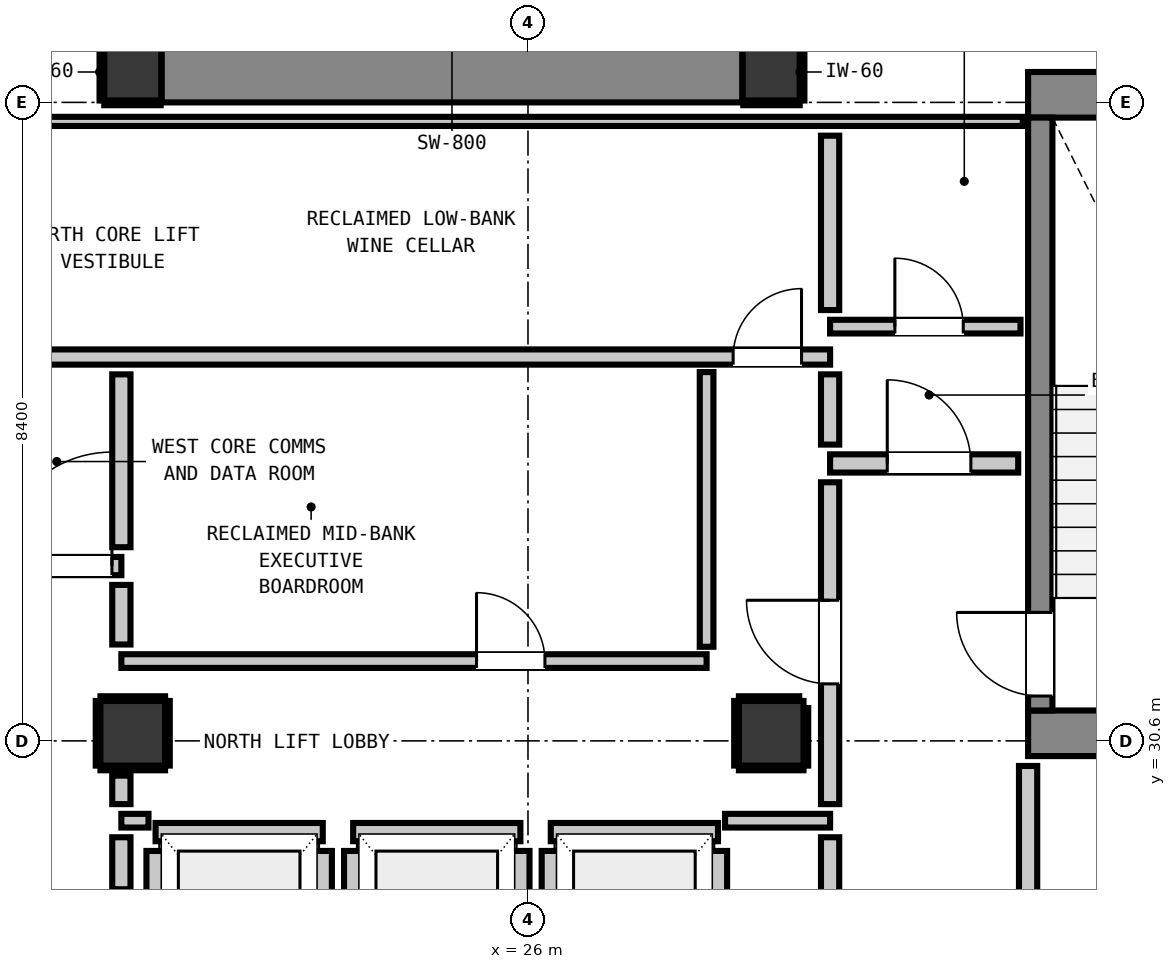
"""IFC4 building model, lengths in metres.
Left out: names, types, materials, properties, quantities, classifications, styles, units other than length and angle.
Written with IfcOpenShell. Run it as: python <this file> out.ifc"""

import sys

from ifc_helpers import new_model, si_unit, direction, frame, frame_2d, origin, origin_2d, place, context, subcontext, project, spatial, rectangle, extrude, element, fill, save


model = new_model("IFC4")
c1 = context("Model", 3, precision=1e-05, world=origin(), true_north=direction((0.0, 1.0)))
c2 = subcontext(c1, "Body", "Model", "MODEL_VIEW")
j1 = project(units=[si_unit("LENGTHUNIT", "METRE"), si_unit("PLANEANGLEUNIT", "RADIAN")], contexts=[c1])
p1 = place(None, origin())
s1 = spatial("IfcSite", under=j1, at=p1, CompositionType="ELEMENT")
p2 = place(p1, origin())
s2 = spatial("IfcBuilding", under=s1, at=p2, CompositionType="ELEMENT")
p3 = place(p2, frame((0.0, 0.0, 265.56)))
s3 = spatial("IfcBuildingStorey", under=s2, at=p3, CompositionType="ELEMENT", Elevation=265.56)
for number, where, z_axis, x_axis in (
    (1, (20.8, 39.4, 0.0), (0.0, 0.0, 1.0), (1.0, 0.0, 0.0)),
    (2, (29.2, 39.4, 0.0), (0.0, 0.0, 1.0), (1.0, 0.0, 0.0)),
):
    element("IfcColumn", number, at=place(p3, frame(where, z_axis=z_axis, x_axis=x_axis)), inside=s3, PredefinedType="COLUMN", context=c2, shape_type="SweptSolid", body=[
        extrude(rectangle(XDim=0.75, YDim=0.75, at=origin_2d()), origin(), (0.0, 0.0, 1.0), 3.32),
    ])
p4 = place(p3, frame((32.58, 39.1, 0.0), z_axis=(0.0, 0.0, 1.0), x_axis=(1.0, 0.0, 0.0)))
e3 = element("IfcWall", 3, at=p4, inside=s3, PredefinedType="SHEAR", context=c2, shape_type="SweptSolid", body=[
    extrude(rectangle(XDim=4.08, YDim=0.6, at=frame_2d((2.04, 0.0))), origin(), (0.0, 0.0, 1.0), 3.32),
])
p5 = place(p3, frame((32.58, 30.7, 0.0), z_axis=(0.0, 0.0, 1.0), x_axis=(1.0, 0.0, 0.0)))
e4 = element("IfcWall", 4, at=p5, inside=s3, PredefinedType="SHEAR", context=c2, shape_type="SweptSolid", body=[
    extrude(rectangle(XDim=3.54, YDim=0.6, at=frame_2d((1.77, 0.0))), origin(), (0.0, 0.0, 1.0), 3.32),
])
p6 = place(p3, frame((21.18, 39.4, 0.0), z_axis=(0.0, 0.0, 1.0), x_axis=(1.0, 0.0, 0.0)))
e5 = element("IfcWall", 5, at=p6, inside=s3, PredefinedType="SHEAR", context=c2, shape_type="SweptSolid", body=[
    extrude(rectangle(XDim=7.64, YDim=0.8, at=frame_2d((3.82, 0.0))), origin(), (0.0, 0.0, 1.0), 3.32),
])
p7 = place(p3, frame((32.74, 31.0, 0.0), z_axis=(0.0, 0.0, 1.0), x_axis=(0.0, 1.0, 0.0)))
e6 = element("IfcWall", 6, at=p7, inside=s3, PredefinedType="SHEAR", context=c2, shape_type="SweptSolid", body=[
    extrude(rectangle(XDim=7.8, YDim=0.32, at=frame_2d((3.9, 0.0))), origin(), (0.0, 0.0, 1.0), 3.32),
])
p8 = place(p7, frame((0.19, 0.0, 0.0)))
e7 = element("IfcOpeningElement", 7, at=p8, cuts=e6, PredefinedType="OPENING", context=c2, shape_type="SweptSolid", body=[
    extrude(rectangle(XDim=1.1, YDim=2.15, at=frame_2d((0.55, 1.075))), frame((0.0, 0.17, 0.0), z_axis=(0.0, -1.0, 0.0), x_axis=(1.0, 0.0, 0.0)), (0.0, 0.0, 1.0), 0.34),
])
for number, where, z_axis, x_axis in (
    (8, (20.8, 30.7, 0.0), (0.0, 0.0, 1.0), (1.0, 0.0, 0.0)),
    (9, (29.2, 30.7, 0.0), (0.0, 0.0, 1.0), (1.0, 0.0, 0.0)),
):
    element("IfcColumn", number, at=place(p3, frame(where, z_axis=z_axis, x_axis=x_axis)), inside=s3, PredefinedType="COLUMN", context=c2, shape_type="SweptSolid", body=[
        extrude(rectangle(XDim=0.85, YDim=0.85, at=origin_2d()), origin(), (0.0, 0.0, 1.0), 3.32),
    ])
p9 = place(p3, frame((21.1, 29.4, 0.0), z_axis=(0.0, 0.0, 1.0), x_axis=(1.0, 0.0, 0.0)))
e10 = element("IfcWall", 10, at=p9, inside=s3, PredefinedType="PARTITIONING", context=c2, shape_type="SweptSolid", body=[
    extrude(rectangle(XDim=2.2, YDim=0.24, at=frame_2d((1.1, 0.0))), origin(), (0.0, 0.0, 1.0), 3.1),
])
p10 = place(p3, frame((21.1, 27.048, 0.0), z_axis=(0.0, 0.0, 1.0), x_axis=(0.0, 1.0, 0.0)))
e11 = element("IfcWall", 11, at=p10, inside=s3, PredefinedType="PARTITIONING", context=c2, shape_type="SweptSolid", body=[
    extrude(rectangle(XDim=2.104, YDim=0.24, at=frame_2d((1.052, 0.0))), origin(), (0.0, 0.0, 1.0), 2.335),
])
p11 = place(p3, frame((23.3, 27.048, 0.0), z_axis=(0.0, 0.0, 1.0), x_axis=(0.0, 1.0, 0.0)))
e12 = element("IfcWall", 12, at=p11, inside=s3, PredefinedType="PARTITIONING", context=c2, shape_type="SweptSolid", body=[
    extrude(rectangle(XDim=2.104, YDim=0.24, at=frame_2d((1.052, 0.0))), origin(), (0.0, 0.0, 1.0), 3.1),
])
p12 = place(p3, frame((23.7, 29.4, 0.0), z_axis=(0.0, 0.0, 1.0), x_axis=(1.0, 0.0, 0.0)))
e13 = element("IfcWall", 13, at=p12, inside=s3, PredefinedType="PARTITIONING", context=c2, shape_type="SweptSolid", body=[
    extrude(rectangle(XDim=2.2, YDim=0.24, at=frame_2d((1.1, 0.0))), origin(), (0.0, 0.0, 1.0), 3.1),
])
for number, where, z_axis, x_axis in (
    (14, (23.7, 27.048, 0.0), (0.0, 0.0, 1.0), (0.0, 1.0, 0.0)),
    (15, (25.9, 27.048, 0.0), (0.0, 0.0, 1.0), (0.0, 1.0, 0.0)),
):
    element("IfcWall", number, at=place(p3, frame(where, z_axis=z_axis, x_axis=x_axis)), inside=s3, PredefinedType="PARTITIONING", context=c2, shape_type="SweptSolid", body=[
        extrude(rectangle(XDim=2.104, YDim=0.24, at=frame_2d((1.052, 0.0))), origin(), (0.0, 0.0, 1.0), 3.1),
    ])
p13 = place(p3, frame((26.3, 29.4, 0.0), z_axis=(0.0, 0.0, 1.0), x_axis=(1.0, 0.0, 0.0)))
e16 = element("IfcWall", 16, at=p13, inside=s3, PredefinedType="PARTITIONING", context=c2, shape_type="SweptSolid", body=[
    extrude(rectangle(XDim=2.2, YDim=0.24, at=frame_2d((1.1, 0.0))), origin(), (0.0, 0.0, 1.0), 3.1),
])
p14 = place(p3, frame((26.3, 27.048, 0.0), z_axis=(0.0, 0.0, 1.0), x_axis=(0.0, 1.0, 0.0)))
e17 = element("IfcWall", 17, at=p14, inside=s3, PredefinedType="PARTITIONING", context=c2, shape_type="SweptSolid", body=[
    extrude(rectangle(XDim=2.104, YDim=0.24, at=frame_2d((1.052, 0.0))), origin(), (0.0, 0.0, 1.0), 3.1),
])
p15 = place(p3, frame((28.5, 27.33, 0.0), z_axis=(0.0, 0.0, 1.0), x_axis=(0.0, 1.0, 0.0)))
e18 = element("IfcWall", 18, at=p15, inside=s3, PredefinedType="PARTITIONING", context=c2, shape_type="SweptSolid", body=[
    extrude(rectangle(XDim=1.822, YDim=0.24, at=frame_2d((0.911, 0.0))), origin(), (0.0, 0.0, 1.0), 3.1),
])
p16 = place(p3, frame((17.45, 32.9, 0.0), z_axis=(0.0, 0.0, 1.0), x_axis=(1.0, 0.0, 0.0)))
e19 = element("IfcWall", 19, at=p16, inside=s3, PredefinedType="PARTITIONING", context=c2, shape_type="SweptSolid", body=[
    extrude(rectangle(XDim=3.2, YDim=0.24, at=frame_2d((1.6, 0.0))), origin(), (0.0, 0.0, 1.0), 3.1),
])
p17 = place(p16, frame((0.159, 0.0, 0.0)))
e20 = element("IfcOpeningElement", 20, at=p17, cuts=e19, PredefinedType="OPENING", context=c2, shape_type="SweptSolid", body=[
    extrude(rectangle(XDim=1.1, YDim=2.15, at=frame_2d((0.55, 1.075))), frame((0.0, 0.13, 0.0), z_axis=(0.0, -1.0, 0.0), x_axis=(1.0, 0.0, 0.0)), (0.0, 0.0, 1.0), 0.26),
])
p18 = place(p16, frame((1.576, 0.0, 0.0)))
e21 = element("IfcOpeningElement", 21, at=p18, cuts=e19, PredefinedType="OPENING", context=c2, shape_type="SweptSolid", body=[
    extrude(rectangle(XDim=1.5, YDim=2.15, at=frame_2d((0.75, 1.075))), frame((0.0, 0.13, 0.0), z_axis=(0.0, -1.0, 0.0), x_axis=(1.0, 0.0, 0.0)), (0.0, 0.0, 1.0), 0.26),
])
p19 = place(p3, frame((29.975, 34.25, 0.0), z_axis=(0.0, 0.0, 1.0), x_axis=(1.0, 0.0, 0.0)))
e22 = element("IfcWall", 22, at=p19, inside=s3, PredefinedType="PARTITIONING", context=c2, shape_type="SweptSolid", body=[
    extrude(rectangle(XDim=2.475, YDim=0.24, at=frame_2d((1.237, 0.0))), origin(), (0.0, 0.0, 1.0), 3.1),
])
p20 = place(p19, frame((0.752, 0.0, 0.0)))
e23 = element("IfcOpeningElement", 23, at=p20, cuts=e22, PredefinedType="OPENING", context=c2, shape_type="SweptSolid", body=[
    extrude(rectangle(XDim=1.1, YDim=2.15, at=frame_2d((0.55, 1.075))), frame((0.0, 0.13, 0.0), z_axis=(0.0, -1.0, 0.0), x_axis=(1.0, 0.0, 0.0)), (0.0, 0.0, 1.0), 0.26),
])
p21 = place(p3, frame((18.95, 35.65, 0.0), z_axis=(0.0, 0.0, 1.0), x_axis=(1.0, 0.0, 0.0)))
e24 = element("IfcWall", 24, at=p21, inside=s3, PredefinedType="PARTITIONING", context=c2, shape_type="SweptSolid", body=[
    extrude(rectangle(XDim=11.025, YDim=0.2, at=frame_2d((5.513, 0.0))), origin(), (0.0, 0.0, 1.0), 3.1),
])
p22 = place(p21, frame((9.749, 0.0, 0.0)))
e25 = element("IfcOpeningElement", 25, at=p22, cuts=e24, PredefinedType="OPENING", context=c2, shape_type="SweptSolid", body=[
    extrude(rectangle(XDim=0.9, YDim=2.1, at=frame_2d((0.45, 1.05))), frame((0.0, 0.11, 0.0), z_axis=(0.0, -1.0, 0.0), x_axis=(1.0, 0.0, 0.0)), (0.0, 0.0, 1.0), 0.22),
])
p23 = place(p3, frame((20.65, 29.55, 0.0), z_axis=(0.0, 0.0, 1.0), x_axis=(1.0, 0.0, 0.0)))
e26 = element("IfcWall", 26, at=p23, inside=s3, PredefinedType="PARTITIONING", context=c2, shape_type="SweptSolid", body=[
    extrude(rectangle(XDim=0.357, YDim=0.18, at=frame_2d((0.179, 0.0))), origin(), (0.0, 0.0, 1.0), 3.1),
])
p24 = place(p3, frame((28.593, 29.55, 0.0), z_axis=(0.0, 0.0, 1.0), x_axis=(1.0, 0.0, 0.0)))
e27 = element("IfcWall", 27, at=p24, inside=s3, PredefinedType="PARTITIONING", context=c2, shape_type="SweptSolid", body=[
    extrude(rectangle(XDim=1.382, YDim=0.18, at=frame_2d((0.691, 0.0))), origin(), (0.0, 0.0, 1.0), 3.1),
])
p25 = place(p3, frame((20.65, 31.65, 0.0), z_axis=(0.0, 0.0, 1.0), x_axis=(1.0, 0.0, 0.0)))
e28 = element("IfcWall", 28, at=p25, inside=s3, PredefinedType="PARTITIONING", context=c2, shape_type="SweptSolid", body=[
    extrude(rectangle(XDim=7.7, YDim=0.18, at=frame_2d((3.85, 0.0))), origin(), (0.0, 0.0, 1.0), 3.1),
])
p26 = place(p25, frame((4.673, 0.0, 0.0)))
e29 = element("IfcOpeningElement", 29, at=p26, cuts=e28, PredefinedType="OPENING", context=c2, shape_type="SweptSolid", body=[
    extrude(rectangle(XDim=0.9, YDim=2.1, at=frame_2d((0.45, 1.05))), frame((0.0, 0.1, 0.0), z_axis=(0.0, -1.0, 0.0), x_axis=(1.0, 0.0, 0.0)), (0.0, 0.0, 1.0), 0.2),
])
p27 = place(p3, frame((29.975, 36.05, 0.0), z_axis=(0.0, 0.0, 1.0), x_axis=(1.0, 0.0, 0.0)))
e30 = element("IfcWall", 30, at=p27, inside=s3, PredefinedType="PARTITIONING", context=c2, shape_type="SweptSolid", body=[
    extrude(rectangle(XDim=2.505, YDim=0.18, at=frame_2d((1.252, 0.0))), origin(), (0.0, 0.0, 1.0), 3.1),
])
p28 = place(p27, frame((0.852, 0.0, 0.0)))
e31 = element("IfcOpeningElement", 31, at=p28, cuts=e30, PredefinedType="OPENING", context=c2, shape_type="SweptSolid", body=[
    extrude(rectangle(XDim=0.9, YDim=2.1, at=frame_2d((0.45, 1.05))), frame((0.0, 0.1, 0.0), z_axis=(0.0, -1.0, 0.0), x_axis=(1.0, 0.0, 0.0)), (0.0, 0.0, 1.0), 0.2),
])
p29 = place(p3, frame((18.95, 38.75, 0.0), z_axis=(0.0, 0.0, 1.0), x_axis=(1.0, 0.0, 0.0)))
e32 = element("IfcWall", 32, at=p29, inside=s3, PredefinedType="PARTITIONING", context=c2, shape_type="SweptSolid", body=[
    extrude(rectangle(XDim=13.56, YDim=0.12, at=frame_2d((6.78, 0.0))), origin(), (0.0, 0.0, 1.0), 3.1),
])
p30 = place(p3, frame((20.65, 28.648, 0.0), z_axis=(0.0, 0.0, 1.0), x_axis=(0.0, 1.0, 0.0)))
e33 = element("IfcWall", 33, at=p30, inside=s3, PredefinedType="PARTITIONING", context=c2, shape_type="SweptSolid", body=[
    extrude(rectangle(XDim=0.684, YDim=0.24, at=frame_2d((0.342, 0.0))), origin(), (0.0, 0.0, 1.0), 2.335),
])
p31 = place(p3, frame((20.65, 29.768, 0.0), z_axis=(0.0, 0.0, 1.0), x_axis=(0.0, 1.0, 0.0)))
e34 = element("IfcWall", 34, at=p31, inside=s3, PredefinedType="PARTITIONING", context=c2, shape_type="SweptSolid", body=[
    extrude(rectangle(XDim=0.375, YDim=0.24, at=frame_2d((0.188, 0.0))), origin(), (0.0, 0.0, 1.0), 2.335),
])
p32 = place(p3, frame((20.65, 31.868, 0.0), z_axis=(0.0, 0.0, 1.0), x_axis=(0.0, 1.0, 0.0)))
e35 = element("IfcWall", 35, at=p32, inside=s3, PredefinedType="PARTITIONING", context=c2, shape_type="SweptSolid", body=[
    extrude(rectangle(XDim=0.784, YDim=0.24, at=frame_2d((0.392, 0.0))), origin(), (0.0, 0.0, 1.0), 2.335),
])
p33 = place(p3, frame((20.65, 33.148, 0.0), z_axis=(0.0, 0.0, 1.0), x_axis=(0.0, 1.0, 0.0)))
e36 = element("IfcWall", 36, at=p33, inside=s3, PredefinedType="PARTITIONING", context=c2, shape_type="SweptSolid", body=[
    extrude(rectangle(XDim=2.274, YDim=0.24, at=frame_2d((1.137, 0.0))), origin(), (0.0, 0.0, 1.0), 2.335),
])
p34 = place(p3, frame((29.975, 25.648, 0.0), z_axis=(0.0, 0.0, 1.0), x_axis=(0.0, 1.0, 0.0)))
e37 = element("IfcWall", 37, at=p34, inside=s3, PredefinedType="PARTITIONING", context=c2, shape_type="SweptSolid", body=[
    extrude(rectangle(XDim=3.684, YDim=0.24, at=frame_2d((1.842, 0.0))), origin(), (0.0, 0.0, 1.0), 3.1),
])
p35 = place(p3, frame((29.975, 29.768, 0.0), z_axis=(0.0, 0.0, 1.0), x_axis=(0.0, 1.0, 0.0)))
e38 = element("IfcWall", 38, at=p35, inside=s3, PredefinedType="PARTITIONING", context=c2, shape_type="SweptSolid", body=[
    extrude(rectangle(XDim=4.234, YDim=0.24, at=frame_2d((2.117, 0.0))), origin(), (0.0, 0.0, 1.0), 3.1),
])
p36 = place(p35, frame((1.582, 0.0, 0.0)))
e39 = element("IfcOpeningElement", 39, at=p36, cuts=e38, PredefinedType="OPENING", context=c2, shape_type="SweptSolid", body=[
    extrude(rectangle(XDim=1.1, YDim=2.15, at=frame_2d((0.55, 1.075))), frame((0.0, 0.13, 0.0), z_axis=(0.0, -1.0, 0.0), x_axis=(1.0, 0.0, 0.0)), (0.0, 0.0, 1.0), 0.26),
])
p37 = place(p3, frame((29.975, 34.498, 0.0), z_axis=(0.0, 0.0, 1.0), x_axis=(0.0, 1.0, 0.0)))
e40 = element("IfcWall", 40, at=p37, inside=s3, PredefinedType="PARTITIONING", context=c2, shape_type="SweptSolid", body=[
    extrude(rectangle(XDim=0.924, YDim=0.24, at=frame_2d((0.462, 0.0))), origin(), (0.0, 0.0, 1.0), 3.1),
])
p38 = place(p3, frame((29.975, 36.268, 0.0), z_axis=(0.0, 0.0, 1.0), x_axis=(0.0, 1.0, 0.0)))
e41 = element("IfcWall", 41, at=p38, inside=s3, PredefinedType="PARTITIONING", context=c2, shape_type="SweptSolid", body=[
    extrude(rectangle(XDim=2.294, YDim=0.24, at=frame_2d((1.147, 0.0))), origin(), (0.0, 0.0, 1.0), 3.1),
])
p39 = place(p3, frame((32.58, 25.648, 0.0), z_axis=(0.0, 0.0, 1.0), x_axis=(0.0, 1.0, 0.0)))
e42 = element("IfcWall", 42, at=p39, inside=s3, PredefinedType="PARTITIONING", context=c2, shape_type="SweptSolid", body=[
    extrude(rectangle(XDim=4.622, YDim=0.24, at=frame_2d((2.311, 0.0))), origin(), (0.0, 0.0, 1.0), 3.1),
])
p40 = place(p3, frame((28.35, 31.838, 0.0), z_axis=(0.0, 0.0, 1.0), x_axis=(0.0, 1.0, 0.0)))
e43 = element("IfcWall", 43, at=p40, inside=s3, PredefinedType="PARTITIONING", context=c2, shape_type="SweptSolid", body=[
    extrude(rectangle(XDim=3.614, YDim=0.18, at=frame_2d((1.807, 0.0))), origin(), (0.0, 0.0, 1.0), 3.1),
])
p41 = place(p3, frame((20.425, 38.993, 0.0), z_axis=(0.0, 0.0, 1.0), x_axis=(1.0, 0.0, 0.0)))
e44 = element("IfcWall", 44, at=p41, inside=s3, PredefinedType="PARTITIONING", context=c2, shape_type="SweptSolid", body=[
    extrude(rectangle(XDim=0.742, YDim=0.06, at=frame_2d((0.371, 0.0))), origin(), (0.0, 0.0, 1.0), 1.45),
])
p42 = place(p3, frame((20.393, 39.025, 0.0), z_axis=(0.0, 0.0, 1.0), x_axis=(0.0, 1.0, 0.0)))
e45 = element("IfcWall", 45, at=p42, inside=s3, PredefinedType="PARTITIONING", context=c2, shape_type="SweptSolid", body=[
    extrude(rectangle(XDim=0.75, YDim=0.06, at=frame_2d((0.375, 0.0))), origin(), (0.0, 0.0, 1.0), 1.45),
])
p43 = place(p3, frame((28.833, 38.993, 0.0), z_axis=(0.0, 0.0, 1.0), x_axis=(1.0, 0.0, 0.0)))
e46 = element("IfcWall", 46, at=p43, inside=s3, PredefinedType="PARTITIONING", context=c2, shape_type="SweptSolid", body=[
    extrude(rectangle(XDim=0.742, YDim=0.06, at=frame_2d((0.371, 0.0))), origin(), (0.0, 0.0, 1.0), 1.45),
])
p44 = place(p3, frame((29.607, 39.025, 0.0), z_axis=(0.0, 0.0, 1.0), x_axis=(0.0, 1.0, 0.0)))
e47 = element("IfcWall", 47, at=p44, inside=s3, PredefinedType="PARTITIONING", context=c2, shape_type="SweptSolid", body=[
    extrude(rectangle(XDim=0.75, YDim=0.06, at=frame_2d((0.375, 0.0))), origin(), (0.0, 0.0, 1.0), 1.45),
])
for number, where, z_axis, x_axis in (
    (48, (20.375, 30.243, 0.0), (0.0, 0.0, 1.0), (1.0, 0.0, 0.0)),
    (49, (20.375, 31.157, 0.0), (0.0, 0.0, 1.0), (1.0, 0.0, 0.0)),
    (50, (20.343, 30.275, 0.0), (0.0, 0.0, 1.0), (0.0, 1.0, 0.0)),
    (51, (21.257, 30.275, 0.0), (0.0, 0.0, 1.0), (0.0, 1.0, 0.0)),
    (52, (28.775, 30.243, 0.0), (0.0, 0.0, 1.0), (1.0, 0.0, 0.0)),
):
    element("IfcWall", number, at=place(p3, frame(where, z_axis=z_axis, x_axis=x_axis)), inside=s3, PredefinedType="PARTITIONING", context=c2, shape_type="SweptSolid", body=[
        extrude(rectangle(XDim=0.85, YDim=0.06, at=frame_2d((0.425, 0.0))), origin(), (0.0, 0.0, 1.0), 1.45),
    ])
p45 = place(p3, frame((28.775, 31.157, 0.0), z_axis=(0.0, 0.0, 1.0), x_axis=(1.0, 0.0, 0.0)))
e53 = element("IfcWall", 53, at=p45, inside=s3, PredefinedType="PARTITIONING", context=c2, shape_type="SweptSolid", body=[
    extrude(rectangle(XDim=0.794, YDim=0.06, at=frame_2d((0.397, 0.0))), origin(), (0.0, 0.0, 1.0), 1.45),
])
p46 = place(p3, frame((28.743, 30.275, 0.0), z_axis=(0.0, 0.0, 1.0), x_axis=(0.0, 1.0, 0.0)))
e54 = element("IfcWall", 54, at=p46, inside=s3, PredefinedType="PARTITIONING", context=c2, shape_type="SweptSolid", body=[
    extrude(rectangle(XDim=0.85, YDim=0.06, at=frame_2d((0.425, 0.0))), origin(), (0.0, 0.0, 1.0), 1.45),
])
p47 = place(p3, frame((29.657, 30.275, 0.0), z_axis=(0.0, 0.0, 1.0), x_axis=(0.0, 1.0, 0.0)))
e55 = element("IfcWall", 55, at=p47, inside=s3, PredefinedType="PARTITIONING", context=c2, shape_type="SweptSolid", body=[
    extrude(rectangle(XDim=0.757, YDim=0.06, at=frame_2d((0.378, 0.0))), origin(), (0.0, 0.0, 1.0), 1.45),
])
p48 = place(p8, origin())
e56 = element("IfcDoor", 56, at=p48, inside=s3, OperationType="SINGLE_SWING_RIGHT", PredefinedType="DOOR", context=c2, shape_type="SweptSolid", body=[
    extrude(rectangle(XDim=1.1, YDim=2.15, at=frame_2d((0.55, 1.075))), frame((0.0, 0.025, 0.0), z_axis=(0.0, -1.0, 0.0), x_axis=(1.0, 0.0, 0.0)), (0.0, 0.0, 1.0), 0.05),
])
fill(e7, e56)
p49 = place(p36, origin())
e57 = element("IfcDoor", 57, at=p49, inside=s3, OperationType="SINGLE_SWING_RIGHT", PredefinedType="DOOR", context=c2, shape_type="SweptSolid", body=[
    extrude(rectangle(XDim=1.1, YDim=2.15, at=frame_2d((0.55, 1.075))), frame((0.0, 0.025, 0.0), z_axis=(0.0, -1.0, 0.0), x_axis=(1.0, 0.0, 0.0)), (0.0, 0.0, 1.0), 0.05),
])
fill(e39, e57)
p50 = place(p20, origin())
e58 = element("IfcDoor", 58, at=p50, inside=s3, OperationType="SINGLE_SWING_LEFT", PredefinedType="DOOR", context=c2, shape_type="SweptSolid", body=[
    extrude(rectangle(XDim=1.1, YDim=2.15, at=frame_2d((0.55, 1.075))), frame((0.0, 0.025, 0.0), z_axis=(0.0, -1.0, 0.0), x_axis=(1.0, 0.0, 0.0)), (0.0, 0.0, 1.0), 0.05),
])
fill(e23, e58)
p51 = place(p18, origin())
e59 = element("IfcDoor", 59, at=p51, inside=s3, OperationType="SINGLE_SWING_RIGHT", PredefinedType="DOOR", context=c2, shape_type="SweptSolid", body=[
    extrude(rectangle(XDim=1.5, YDim=2.15, at=frame_2d((0.75, 1.075))), frame((0.0, 0.025, 0.0), z_axis=(0.0, -1.0, 0.0), x_axis=(1.0, 0.0, 0.0)), (0.0, 0.0, 1.0), 0.05),
])
fill(e21, e59)
p52 = place(p28, origin())
e60 = element("IfcDoor", 60, at=p52, inside=s3, OperationType="SINGLE_SWING_LEFT", PredefinedType="DOOR", context=c2, shape_type="SweptSolid", body=[
    extrude(rectangle(XDim=0.9, YDim=2.1, at=frame_2d((0.45, 1.05))), frame((0.0, 0.025, 0.0), z_axis=(0.0, -1.0, 0.0), x_axis=(1.0, 0.0, 0.0)), (0.0, 0.0, 1.0), 0.05),
])
fill(e31, e60)
p53 = place(p22, origin())
e61 = element("IfcDoor", 61, at=p53, inside=s3, OperationType="SINGLE_SWING_RIGHT", PredefinedType="DOOR", context=c2, shape_type="SweptSolid", body=[
    extrude(rectangle(XDim=0.9, YDim=2.1, at=frame_2d((0.45, 1.05))), frame((0.0, 0.025, 0.0), z_axis=(0.0, -1.0, 0.0), x_axis=(1.0, 0.0, 0.0)), (0.0, 0.0, 1.0), 0.05),
])
fill(e25, e61)
p54 = place(p26, origin())
e62 = element("IfcDoor", 62, at=p54, inside=s3, OperationType="SINGLE_SWING_LEFT", PredefinedType="DOOR", context=c2, shape_type="SweptSolid", body=[
    extrude(rectangle(XDim=0.9, YDim=2.1, at=frame_2d((0.45, 1.05))), frame((0.0, 0.025, 0.0), z_axis=(0.0, -1.0, 0.0), x_axis=(1.0, 0.0, 0.0)), (0.0, 0.0, 1.0), 0.05),
])
fill(e29, e62)
save(model, sys.argv[1])
